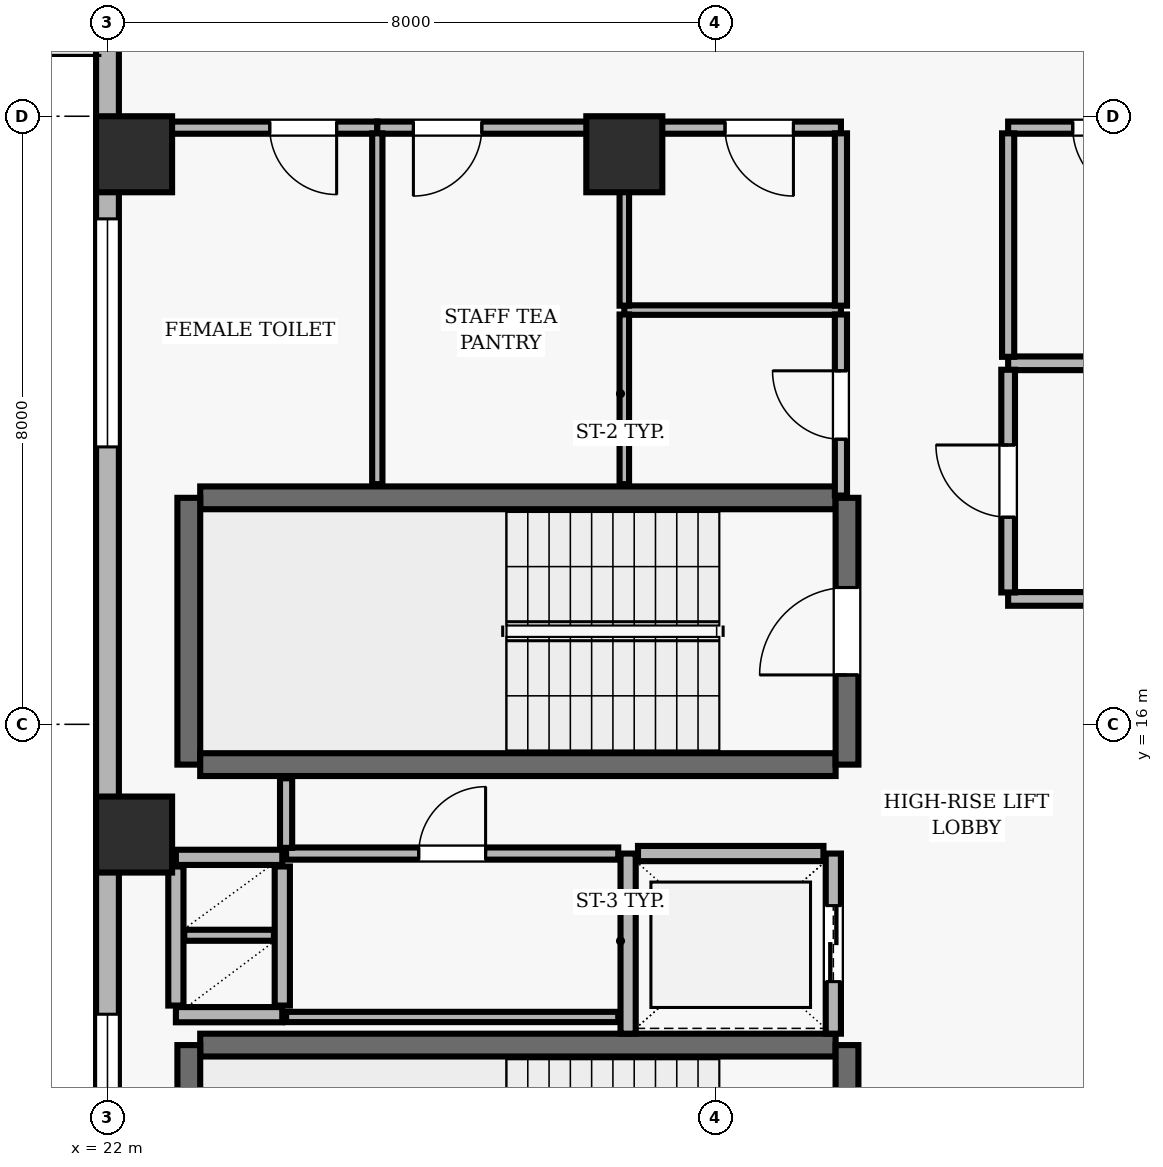
"""IFC4 building model, lengths in metres.
Left out: names, types, materials, properties, quantities, classifications, styles, units other than length and angle.
Written with IfcOpenShell. Run it as: python <this file> out.ifc"""

import sys

from ifc_helpers import new_model, si_unit, direction, frame, frame_2d, origin, origin_2d, place, context, subcontext, project, spatial, rectangle, extrude, element, fill, save


model = new_model("IFC4")
c1 = context("Model", 3, precision=1e-05, world=origin(), true_north=direction((0.0, 1.0)))
c2 = subcontext(c1, "Body", "Model", "MODEL_VIEW")
j1 = project(units=[si_unit("LENGTHUNIT", "METRE"), si_unit("PLANEANGLEUNIT", "RADIAN")], contexts=[c1])
p1 = place(None, origin())
s1 = spatial("IfcSite", under=j1, at=p1, CompositionType="ELEMENT")
p2 = place(p1, origin())
s2 = spatial("IfcBuilding", under=s1, at=p2, CompositionType="ELEMENT")
p3 = place(p2, frame((0.0, 0.0, 195.3)))
s3 = spatial("IfcBuildingStorey", under=s2, at=p3, CompositionType="ELEMENT", Elevation=195.3)
for number, where, z_axis, x_axis in (
    (1, (22.35, 14.55, 0.0), (0.0, 0.0, 1.0), (1.0, 0.0, 0.0)),
    (2, (22.35, 23.5, 0.0), (0.0, 0.0, 1.0), (1.0, 0.0, 0.0)),
    (3, (28.8, 23.5, 0.0), (0.0, 0.0, 1.0), (1.0, 0.0, 0.0)),
):
    element("IfcColumn", number, at=place(p3, frame(where, z_axis=z_axis, x_axis=x_axis)), inside=s3, PredefinedType="COLUMN", context=c2, shape_type="SweptSolid", body=[
        extrude(rectangle(XDim=1.0, YDim=1.0, at=origin_2d()), origin(), (0.0, 0.0, 1.0), 3.9),
    ])
p4 = place(p3, frame((22.0, 40.7, 0.0), z_axis=(0.0, 0.0, 1.0), x_axis=(0.0, -1.0, 0.0)))
e4 = element("IfcWall", 4, at=p4, inside=s3, PredefinedType="SOLIDWALL", context=c2, shape_type="SweptSolid", body=[
    extrude(rectangle(XDim=38.2, YDim=0.3, at=frame_2d((19.1, 0.0))), origin(), (0.0, 0.0, 1.0), 3.69),
])
p5 = place(p4, frame((7.8, 0.0, 0.0)))
e5 = element("IfcOpeningElement", 5, at=p5, cuts=e4, PredefinedType="OPENING", context=c2, shape_type="SweptSolid", body=[
    extrude(rectangle(XDim=1.0, YDim=2.2, at=frame_2d((0.5, 1.1))), frame((0.0, 0.16, 0.0), z_axis=(0.0, -1.0, 0.0), x_axis=(1.0, 0.0, 0.0)), (0.0, 0.0, 1.0), 0.32),
])
p6 = place(p4, frame((1.229, 0.0, 0.9)))
e6 = element("IfcOpeningElement", 6, at=p6, cuts=e4, PredefinedType="OPENING", context=c2, shape_type="SweptSolid", body=[
    extrude(rectangle(XDim=3.0, YDim=2.2, at=frame_2d((1.5, 1.1))), frame((0.0, 0.16, 0.0), z_axis=(0.0, -1.0, 0.0), x_axis=(1.0, 0.0, 0.0)), (0.0, 0.0, 1.0), 0.32),
])
p7 = place(p4, frame((18.05, 0.0, 0.9)))
e7 = element("IfcOpeningElement", 7, at=p7, cuts=e4, PredefinedType="OPENING", context=c2, shape_type="SweptSolid", body=[
    extrude(rectangle(XDim=3.0, YDim=2.2, at=frame_2d((1.5, 1.1))), frame((0.0, 0.16, 0.0), z_axis=(0.0, -1.0, 0.0), x_axis=(1.0, 0.0, 0.0)), (0.0, 0.0, 1.0), 0.32),
])
p8 = place(p4, frame((28.514, 0.0, 0.9)))
e8 = element("IfcOpeningElement", 8, at=p8, cuts=e4, PredefinedType="OPENING", context=c2, shape_type="SweptSolid", body=[
    extrude(rectangle(XDim=3.0, YDim=2.2, at=frame_2d((1.5, 1.1))), frame((0.0, 0.16, 0.0), z_axis=(0.0, -1.0, 0.0), x_axis=(1.0, 0.0, 0.0)), (0.0, 0.0, 1.0), 0.32),
])
p9 = place(p3, frame((31.58, 18.98, 0.0), z_axis=(0.0, 0.0, 1.0), x_axis=(-1.0, 0.0, 0.0)))
e9 = element("IfcWall", 9, at=p9, inside=s3, PredefinedType="SHEAR", context=c2, shape_type="SweptSolid", body=[
    extrude(rectangle(XDim=8.36, YDim=0.3, at=frame_2d((4.18, 0.0))), origin(), (0.0, 0.0, 1.0), 3.69),
])
p10 = place(p3, frame((23.07, 18.98, 0.0), z_axis=(0.0, 0.0, 1.0), x_axis=(0.0, -1.0, 0.0)))
e10 = element("IfcWall", 10, at=p10, inside=s3, PredefinedType="SHEAR", context=c2, shape_type="SweptSolid", body=[
    extrude(rectangle(XDim=3.51, YDim=0.3, at=frame_2d((1.755, 0.0))), origin(), (0.0, 0.0, 1.0), 3.69),
])
p11 = place(p3, frame((23.22, 15.47, 0.0), z_axis=(0.0, 0.0, 1.0), x_axis=(1.0, 0.0, 0.0)))
e11 = element("IfcWall", 11, at=p11, inside=s3, PredefinedType="SHEAR", context=c2, shape_type="SweptSolid", body=[
    extrude(rectangle(XDim=8.36, YDim=0.3, at=frame_2d((4.18, 0.0))), origin(), (0.0, 0.0, 1.0), 3.69),
])
p12 = place(p3, frame((31.73, 15.47, 0.0), z_axis=(0.0, 0.0, 1.0), x_axis=(0.0, 1.0, 0.0)))
e12 = element("IfcWall", 12, at=p12, inside=s3, PredefinedType="SHEAR", context=c2, shape_type="SweptSolid", body=[
    extrude(rectangle(XDim=3.51, YDim=0.3, at=frame_2d((1.755, 0.0))), origin(), (0.0, 0.0, 1.0), 3.69),
])
p13 = place(p12, frame((1.18, 0.0, 0.0)))
e13 = element("IfcOpeningElement", 13, at=p13, cuts=e12, PredefinedType="OPENING", context=c2, shape_type="SweptSolid", body=[
    extrude(rectangle(XDim=1.15, YDim=2.15, at=frame_2d((0.575, 1.075))), frame((0.0, 0.16, 0.0), z_axis=(0.0, -1.0, 0.0), x_axis=(1.0, 0.0, 0.0)), (0.0, 0.0, 1.0), 0.32),
])
p14 = place(p3, frame((31.58, 11.78, 0.0), z_axis=(0.0, 0.0, 1.0), x_axis=(-1.0, 0.0, 0.0)))
e14 = element("IfcWall", 14, at=p14, inside=s3, PredefinedType="SHEAR", context=c2, shape_type="SweptSolid", body=[
    extrude(rectangle(XDim=8.36, YDim=0.3, at=frame_2d((4.18, 0.0))), origin(), (0.0, 0.0, 1.0), 3.69),
])
p15 = place(p3, frame((23.07, 11.78, 0.0), z_axis=(0.0, 0.0, 1.0), x_axis=(0.0, -1.0, 0.0)))
e15 = element("IfcWall", 15, at=p15, inside=s3, PredefinedType="SHEAR", context=c2, shape_type="SweptSolid", body=[
    extrude(rectangle(XDim=3.51, YDim=0.3, at=frame_2d((1.755, 0.0))), origin(), (0.0, 0.0, 1.0), 3.69),
])
p16 = place(p3, frame((31.73, 8.27, 0.0), z_axis=(0.0, 0.0, 1.0), x_axis=(0.0, 1.0, 0.0)))
e16 = element("IfcWall", 16, at=p16, inside=s3, PredefinedType="SHEAR", context=c2, shape_type="SweptSolid", body=[
    extrude(rectangle(XDim=3.51, YDim=0.3, at=frame_2d((1.755, 0.0))), origin(), (0.0, 0.0, 1.0), 3.69),
])
p17 = place(p16, frame((1.18, 0.0, 0.0)))
e17 = element("IfcOpeningElement", 17, at=p17, cuts=e16, PredefinedType="OPENING", context=c2, shape_type="SweptSolid", body=[
    extrude(rectangle(XDim=1.15, YDim=2.15, at=frame_2d((0.575, 1.075))), frame((0.0, 0.16, 0.0), z_axis=(0.0, -1.0, 0.0), x_axis=(1.0, 0.0, 0.0)), (0.0, 0.0, 1.0), 0.32),
])
p18 = place(p3, frame((28.85, 14.3, 0.0), z_axis=(0.0, 0.0, 1.0), x_axis=(0.0, -1.0, 0.0)))
e18 = element("IfcWall", 18, at=p18, inside=s3, PredefinedType="SOLIDWALL", context=c2, shape_type="SweptSolid", body=[
    extrude(rectangle(XDim=2.37, YDim=0.2, at=frame_2d((1.185, 0.0))), origin(), (0.0, 0.0, 1.0), 3.69),
])
p19 = place(p3, frame((31.55, 11.93, 0.0), z_axis=(0.0, 0.0, 1.0), x_axis=(0.0, 1.0, 0.0)))
e19 = element("IfcWall", 19, at=p19, inside=s3, PredefinedType="SOLIDWALL", context=c2, shape_type="SweptSolid", body=[
    extrude(rectangle(XDim=2.37, YDim=0.2, at=frame_2d((1.185, 0.0))), origin(), (0.0, 0.0, 1.0), 3.69),
])
p20 = place(p19, frame((0.685, 0.0, 0.0)))
e20 = element("IfcOpeningElement", 20, at=p20, cuts=e19, PredefinedType="OPENING", context=c2, shape_type="SweptSolid", body=[
    extrude(rectangle(XDim=1.0, YDim=2.1, at=frame_2d((0.5, 1.05))), frame((0.0, 0.11, 0.0), z_axis=(0.0, -1.0, 0.0), x_axis=(1.0, 0.0, 0.0)), (0.0, 0.0, 1.0), 0.22),
])
p21 = place(p3, frame((31.42, 14.3, 0.0), z_axis=(0.0, 0.0, 1.0), x_axis=(-1.0, 0.0, 0.0)))
e21 = element("IfcWall", 21, at=p21, inside=s3, PredefinedType="SOLIDWALL", context=c2, shape_type="SweptSolid", body=[
    extrude(rectangle(XDim=2.44, YDim=0.2, at=frame_2d((1.22, 0.0))), origin(), (0.0, 0.0, 1.0), 3.69),
])
for number, where, z_axis, x_axis in (
    (22, (22.9, 14.25, 0.0), (0.0, 0.0, 1.0), (1.0, 0.0, 0.0)),
    (23, (22.9, 12.18, 0.0), (0.0, 0.0, 1.0), (1.0, 0.0, 0.0)),
):
    element("IfcWall", number, at=place(p3, frame(where, z_axis=z_axis, x_axis=x_axis)), inside=s3, PredefinedType="SOLIDWALL", context=c2, shape_type="SweptSolid", body=[
        extrude(rectangle(XDim=1.4, YDim=0.2, at=frame_2d((0.7, 0.0))), origin(), (0.0, 0.0, 1.0), 3.69),
    ])
for number, where, z_axis, x_axis in (
    (24, (24.3, 12.3, 0.0), (0.0, 0.0, 1.0), (0.0, 1.0, 0.0)),
    (25, (22.9, 12.3, 0.0), (0.0, 0.0, 1.0), (0.0, 1.0, 0.0)),
):
    element("IfcWall", number, at=place(p3, frame(where, z_axis=z_axis, x_axis=x_axis)), inside=s3, PredefinedType="SOLIDWALL", context=c2, shape_type="SweptSolid", body=[
        extrude(rectangle(XDim=1.83, YDim=0.2, at=frame_2d((0.915, 0.0))), origin(), (0.0, 0.0, 1.0), 3.69),
    ])
p22 = place(p3, frame((23.01, 13.225, 0.0), z_axis=(0.0, 0.0, 1.0), x_axis=(1.0, 0.0, 0.0)))
e26 = element("IfcWall", 26, at=p22, inside=s3, PredefinedType="PARTITIONING", context=c2, shape_type="SweptSolid", body=[
    extrude(rectangle(XDim=1.18, YDim=0.145, at=frame_2d((0.59, 0.0))), origin(), (0.0, 0.0, 1.0), 3.69),
])
p23 = place(p3, frame((24.35, 12.15, 0.0), z_axis=(0.0, 0.0, 1.0), x_axis=(1.0, 0.0, 0.0)))
e27 = element("IfcWall", 27, at=p23, inside=s3, PredefinedType="PARTITIONING", context=c2, shape_type="SweptSolid", body=[
    extrude(rectangle(XDim=4.37, YDim=0.135, at=frame_2d((2.185, 0.0))), origin(), (0.0, 0.0, 1.0), 3.69),
])
p24 = place(p3, frame((24.35, 14.3, 0.0), z_axis=(0.0, 0.0, 1.0), x_axis=(1.0, 0.0, 0.0)))
e28 = element("IfcWall", 28, at=p24, inside=s3, PredefinedType="PARTITIONING", context=c2, shape_type="SweptSolid", body=[
    extrude(rectangle(XDim=4.37, YDim=0.16, at=frame_2d((2.185, 0.0))), origin(), (0.0, 0.0, 1.0), 3.69),
])
p25 = place(p24, frame((1.745, 0.0, 0.0)))
e29 = element("IfcOpeningElement", 29, at=p25, cuts=e28, PredefinedType="OPENING", context=c2, shape_type="SweptSolid", body=[
    extrude(rectangle(XDim=0.88, YDim=2.1, at=frame_2d((0.44, 1.05))), frame((0.0, 0.09, 0.0), z_axis=(0.0, -1.0, 0.0), x_axis=(1.0, 0.0, 0.0)), (0.0, 0.0, 1.0), 0.18),
])
p26 = place(p3, frame((25.55, 23.85, 0.0), z_axis=(0.0, 0.0, 1.0), x_axis=(-1.0, 0.0, 0.0)))
e30 = element("IfcWall", 30, at=p26, inside=s3, PredefinedType="PARTITIONING", context=c2, shape_type="SweptSolid", body=[
    extrude(rectangle(XDim=3.35, YDim=0.16, at=frame_2d((1.675, 0.0))), origin(), (0.0, 0.0, 1.0), 3.146),
])
p27 = place(p26, frame((0.535, 0.0, 0.0)))
e31 = element("IfcOpeningElement", 31, at=p27, cuts=e30, PredefinedType="OPENING", context=c2, shape_type="SweptSolid", body=[
    extrude(rectangle(XDim=0.88, YDim=2.1, at=frame_2d((0.44, 1.05))), frame((0.0, 0.09, 0.0), z_axis=(0.0, -1.0, 0.0), x_axis=(1.0, 0.0, 0.0)), (0.0, 0.0, 1.0), 0.18),
])
p28 = place(p3, frame((28.8, 23.85, 0.0), z_axis=(0.0, 0.0, 1.0), x_axis=(-1.0, 0.0, 0.0)))
e32 = element("IfcWall", 32, at=p28, inside=s3, PredefinedType="PARTITIONING", context=c2, shape_type="SweptSolid", body=[
    extrude(rectangle(XDim=3.25, YDim=0.16, at=frame_2d((1.625, 0.0))), origin(), (0.0, 0.0, 1.0), 3.146),
])
p29 = place(p28, frame((1.875, 0.0, 0.0)))
e33 = element("IfcOpeningElement", 33, at=p29, cuts=e32, PredefinedType="OPENING", context=c2, shape_type="SweptSolid", body=[
    extrude(rectangle(XDim=0.9, YDim=2.1, at=frame_2d((0.45, 1.05))), frame((0.0, 0.09, 0.0), z_axis=(0.0, -1.0, 0.0), x_axis=(1.0, 0.0, 0.0)), (0.0, 0.0, 1.0), 0.18),
])
p30 = place(p3, frame((31.65, 21.45, 0.0), z_axis=(0.0, 0.0, 1.0), x_axis=(-1.0, 0.0, 0.0)))
e34 = element("IfcWall", 34, at=p30, inside=s3, PredefinedType="PARTITIONING", context=c2, shape_type="SweptSolid", body=[
    extrude(rectangle(XDim=2.85, YDim=0.125, at=frame_2d((1.425, 0.0))), origin(), (0.0, 0.0, 1.0), 3.69),
])
p31 = place(p3, frame((31.65, 23.85, 0.0), z_axis=(0.0, 0.0, 1.0), x_axis=(-1.0, 0.0, 0.0)))
e35 = element("IfcWall", 35, at=p31, inside=s3, PredefinedType="PARTITIONING", context=c2, shape_type="SweptSolid", body=[
    extrude(rectangle(XDim=2.85, YDim=0.16, at=frame_2d((1.425, 0.0))), origin(), (0.0, 0.0, 1.0), 3.146),
])
p32 = place(p31, frame((0.625, 0.0, 0.0)))
e36 = element("IfcOpeningElement", 36, at=p32, cuts=e35, PredefinedType="OPENING", context=c2, shape_type="SweptSolid", body=[
    extrude(rectangle(XDim=0.9, YDim=2.1, at=frame_2d((0.45, 1.05))), frame((0.0, 0.09, 0.0), z_axis=(0.0, -1.0, 0.0), x_axis=(1.0, 0.0, 0.0)), (0.0, 0.0, 1.0), 0.18),
])
p33 = place(p3, frame((33.85, 17.65, 0.0), z_axis=(0.0, 0.0, 1.0), x_axis=(1.0, 0.0, 0.0)))
e37 = element("IfcWall", 37, at=p33, inside=s3, PredefinedType="PARTITIONING", context=c2, shape_type="SweptSolid", body=[
    extrude(rectangle(XDim=1.3, YDim=0.18, at=frame_2d((0.65, 0.0))), origin(), (0.0, 0.0, 1.0), 3.69),
])
p34 = place(p3, frame((37.85, 20.75, 0.0), z_axis=(0.0, 0.0, 1.0), x_axis=(-1.0, 0.0, 0.0)))
e38 = element("IfcWall", 38, at=p34, inside=s3, PredefinedType="PARTITIONING", context=c2, shape_type="SweptSolid", body=[
    extrude(rectangle(XDim=4.0, YDim=0.18, at=frame_2d((2.0, 0.0))), origin(), (0.0, 0.0, 1.0), 3.69),
])
p35 = place(p3, frame((37.85, 23.85, 0.0), z_axis=(0.0, 0.0, 1.0), x_axis=(-1.0, 0.0, 0.0)))
e39 = element("IfcWall", 39, at=p35, inside=s3, PredefinedType="PARTITIONING", context=c2, shape_type="SweptSolid", body=[
    extrude(rectangle(XDim=4.0, YDim=0.16, at=frame_2d((2.0, 0.0))), origin(), (0.0, 0.0, 1.0), 3.146),
])
p36 = place(p35, frame((2.25, 0.0, 0.0)))
e40 = element("IfcOpeningElement", 40, at=p36, cuts=e39, PredefinedType="OPENING", context=c2, shape_type="SweptSolid", body=[
    extrude(rectangle(XDim=0.9, YDim=2.1, at=frame_2d((0.45, 1.05))), frame((0.0, 0.09, 0.0), z_axis=(0.0, -1.0, 0.0), x_axis=(1.0, 0.0, 0.0)), (0.0, 0.0, 1.0), 0.18),
])
p37 = place(p3, frame((24.35, 15.29, 0.0), z_axis=(0.0, 0.0, 1.0), x_axis=(0.0, -1.0, 0.0)))
e41 = element("IfcWall", 41, at=p37, inside=s3, PredefinedType="PARTITIONING", context=c2, shape_type="SweptSolid", body=[
    extrude(rectangle(XDim=0.915, YDim=0.16, at=frame_2d((0.458, 0.0))), origin(), (0.0, 0.0, 1.0), 3.69),
])
p38 = place(p3, frame((25.55, 19.16, 0.0), z_axis=(0.0, 0.0, 1.0), x_axis=(0.0, 1.0, 0.0)))
e42 = element("IfcWall", 42, at=p38, inside=s3, PredefinedType="PARTITIONING", context=c2, shape_type="SweptSolid", body=[
    extrude(rectangle(XDim=4.615, YDim=0.135, at=frame_2d((2.308, 0.0))), origin(), (0.0, 0.0, 1.0), 3.69),
])
p39 = place(p3, frame((28.8, 21.392, 0.0), z_axis=(0.0, 0.0, 1.0), x_axis=(0.0, -1.0, 0.0)))
e43 = element("IfcWall", 43, at=p39, inside=s3, PredefinedType="PARTITIONING", context=c2, shape_type="SweptSolid", body=[
    extrude(rectangle(XDim=2.232, YDim=0.125, at=frame_2d((1.116, 0.0))), origin(), (0.0, 0.0, 1.0), 3.69),
])
p40 = place(p3, frame((28.8, 23.775, 0.0), z_axis=(0.0, 0.0, 1.0), x_axis=(0.0, -1.0, 0.0)))
e44 = element("IfcWall", 44, at=p40, inside=s3, PredefinedType="PARTITIONING", context=c2, shape_type="SweptSolid", body=[
    extrude(rectangle(XDim=2.267, YDim=0.125, at=frame_2d((1.133, 0.0))), origin(), (0.0, 0.0, 1.0), 3.69),
])
p41 = place(p3, frame((31.65, 19.01, 0.0), z_axis=(0.0, 0.0, 1.0), x_axis=(0.0, 1.0, 0.0)))
e45 = element("IfcWall", 45, at=p41, inside=s3, PredefinedType="PARTITIONING", context=c2, shape_type="SweptSolid", body=[
    extrude(rectangle(XDim=2.382, YDim=0.16, at=frame_2d((1.191, 0.0))), origin(), (0.0, 0.0, 1.0), 3.69),
])
p42 = place(p41, frame((0.741, 0.0, 0.0)))
e46 = element("IfcOpeningElement", 46, at=p42, cuts=e45, PredefinedType="OPENING", context=c2, shape_type="SweptSolid", body=[
    extrude(rectangle(XDim=0.9, YDim=2.1, at=frame_2d((0.45, 1.05))), frame((0.0, 0.09, 0.0), z_axis=(0.0, -1.0, 0.0), x_axis=(1.0, 0.0, 0.0)), (0.0, 0.0, 1.0), 0.18),
])
p43 = place(p3, frame((31.65, 23.775, 0.0), z_axis=(0.0, 0.0, 1.0), x_axis=(0.0, -1.0, 0.0)))
e47 = element("IfcWall", 47, at=p43, inside=s3, PredefinedType="PARTITIONING", context=c2, shape_type="SweptSolid", body=[
    extrude(rectangle(XDim=2.267, YDim=0.16, at=frame_2d((1.133, 0.0))), origin(), (0.0, 0.0, 1.0), 3.69),
])
p44 = place(p3, frame((33.85, 17.735, 0.0), z_axis=(0.0, 0.0, 1.0), x_axis=(0.0, 1.0, 0.0)))
e48 = element("IfcWall", 48, at=p44, inside=s3, PredefinedType="PARTITIONING", context=c2, shape_type="SweptSolid", body=[
    extrude(rectangle(XDim=2.93, YDim=0.18, at=frame_2d((1.465, 0.0))), origin(), (0.0, 0.0, 1.0), 3.69),
])
p45 = place(p44, frame((0.99, 0.0, 0.0)))
e49 = element("IfcOpeningElement", 49, at=p45, cuts=e48, PredefinedType="OPENING", context=c2, shape_type="SweptSolid", body=[
    extrude(rectangle(XDim=0.95, YDim=2.1, at=frame_2d((0.475, 1.05))), frame((0.0, 0.1, 0.0), z_axis=(0.0, -1.0, 0.0), x_axis=(1.0, 0.0, 0.0)), (0.0, 0.0, 1.0), 0.2),
])
p46 = place(p3, frame((33.85, 20.835, 0.0), z_axis=(0.0, 0.0, 1.0), x_axis=(0.0, 1.0, 0.0)))
e50 = element("IfcWall", 50, at=p46, inside=s3, PredefinedType="PARTITIONING", context=c2, shape_type="SweptSolid", body=[
    extrude(rectangle(XDim=2.94, YDim=0.16, at=frame_2d((1.47, 0.0))), origin(), (0.0, 0.0, 1.0), 3.69),
])
p47 = place(p7, origin())
e51 = element("IfcWindow", 51, at=p47, inside=s3, PartitioningType="SINGLE_PANEL", PredefinedType="WINDOW", context=c2, shape_type="SweptSolid", body=[
    extrude(rectangle(XDim=3.0, YDim=2.2, at=frame_2d((1.5, 1.1))), frame((0.0, 0.03, 0.0), z_axis=(0.0, -1.0, 0.0), x_axis=(1.0, 0.0, 0.0)), (0.0, 0.0, 1.0), 0.06),
])
fill(e7, e51)
p48 = place(p8, origin())
e52 = element("IfcWindow", 52, at=p48, inside=s3, PartitioningType="SINGLE_PANEL", PredefinedType="WINDOW", context=c2, shape_type="SweptSolid", body=[
    extrude(rectangle(XDim=3.0, YDim=2.2, at=frame_2d((1.5, 1.1))), frame((0.0, 0.03, 0.0), z_axis=(0.0, -1.0, 0.0), x_axis=(1.0, 0.0, 0.0)), (0.0, 0.0, 1.0), 0.06),
])
fill(e8, e52)
p49 = place(p13, origin())
e53 = element("IfcDoor", 53, at=p49, inside=s3, OperationType="SINGLE_SWING_LEFT", PredefinedType="DOOR", context=c2, shape_type="SweptSolid", body=[
    extrude(rectangle(XDim=1.15, YDim=2.15, at=frame_2d((0.575, 1.075))), frame((0.0, 0.025, 0.0), z_axis=(0.0, -1.0, 0.0), x_axis=(1.0, 0.0, 0.0)), (0.0, 0.0, 1.0), 0.05),
])
fill(e13, e53)
p50 = place(p20, origin())
e54 = element("IfcDoor", 54, at=p50, inside=s3, OperationType="DOUBLE_DOOR_SLIDING", PredefinedType="DOOR", context=c2, shape_type="SweptSolid", body=[
    extrude(rectangle(XDim=1.0, YDim=2.1, at=frame_2d((0.5, 1.05))), frame((0.0, 0.025, 0.0), z_axis=(0.0, -1.0, 0.0), x_axis=(1.0, 0.0, 0.0)), (0.0, 0.0, 1.0), 0.05),
])
fill(e20, e54)
p51 = place(p45, origin())
e55 = element("IfcDoor", 55, at=p51, inside=s3, OperationType="SINGLE_SWING_RIGHT", PredefinedType="DOOR", context=c2, shape_type="SweptSolid", body=[
    extrude(rectangle(XDim=0.95, YDim=2.1, at=frame_2d((0.475, 1.05))), frame((0.0, 0.025, 0.0), z_axis=(0.0, -1.0, 0.0), x_axis=(1.0, 0.0, 0.0)), (0.0, 0.0, 1.0), 0.05),
])
fill(e49, e55)
p52 = place(p36, origin())
e56 = element("IfcDoor", 56, at=p52, inside=s3, OperationType="SINGLE_SWING_LEFT", PredefinedType="DOOR", context=c2, shape_type="SweptSolid", body=[
    extrude(rectangle(XDim=0.9, YDim=2.1, at=frame_2d((0.45, 1.05))), frame((0.0, 0.025, 0.0), z_axis=(0.0, -1.0, 0.0), x_axis=(1.0, 0.0, 0.0)), (0.0, 0.0, 1.0), 0.05),
])
fill(e40, e56)
p53 = place(p42, origin())
e57 = element("IfcDoor", 57, at=p53, inside=s3, OperationType="SINGLE_SWING_RIGHT", PredefinedType="DOOR", context=c2, shape_type="SweptSolid", body=[
    extrude(rectangle(XDim=0.9, YDim=2.1, at=frame_2d((0.45, 1.05))), frame((0.0, 0.025, 0.0), z_axis=(0.0, -1.0, 0.0), x_axis=(1.0, 0.0, 0.0)), (0.0, 0.0, 1.0), 0.05),
])
fill(e46, e57)
p54 = place(p32, origin())
e58 = element("IfcDoor", 58, at=p54, inside=s3, OperationType="SINGLE_SWING_LEFT", PredefinedType="DOOR", context=c2, shape_type="SweptSolid", body=[
    extrude(rectangle(XDim=0.9, YDim=2.1, at=frame_2d((0.45, 1.05))), frame((0.0, 0.025, 0.0), z_axis=(0.0, -1.0, 0.0), x_axis=(1.0, 0.0, 0.0)), (0.0, 0.0, 1.0), 0.05),
])
fill(e36, e58)
p55 = place(p25, origin())
e59 = element("IfcDoor", 59, at=p55, inside=s3, OperationType="SINGLE_SWING_RIGHT", PredefinedType="DOOR", context=c2, shape_type="SweptSolid", body=[
    extrude(rectangle(XDim=0.88, YDim=2.1, at=frame_2d((0.44, 1.05))), frame((0.0, 0.025, 0.0), z_axis=(0.0, -1.0, 0.0), x_axis=(1.0, 0.0, 0.0)), (0.0, 0.0, 1.0), 0.05),
])
fill(e29, e59)
p56 = place(p27, origin())
e60 = element("IfcDoor", 60, at=p56, inside=s3, OperationType="SINGLE_SWING_LEFT", PredefinedType="DOOR", context=c2, shape_type="SweptSolid", body=[
    extrude(rectangle(XDim=0.88, YDim=2.1, at=frame_2d((0.44, 1.05))), frame((0.0, 0.025, 0.0), z_axis=(0.0, -1.0, 0.0), x_axis=(1.0, 0.0, 0.0)), (0.0, 0.0, 1.0), 0.05),
])
fill(e31, e60)
p57 = place(p29, origin())
e61 = element("IfcDoor", 61, at=p57, inside=s3, OperationType="SINGLE_SWING_RIGHT", PredefinedType="DOOR", context=c2, shape_type="SweptSolid", body=[
    extrude(rectangle(XDim=0.9, YDim=2.1, at=frame_2d((0.45, 1.05))), frame((0.0, 0.025, 0.0), z_axis=(0.0, -1.0, 0.0), x_axis=(1.0, 0.0, 0.0)), (0.0, 0.0, 1.0), 0.05),
])
fill(e33, e61)
save(model, sys.argv[1])
